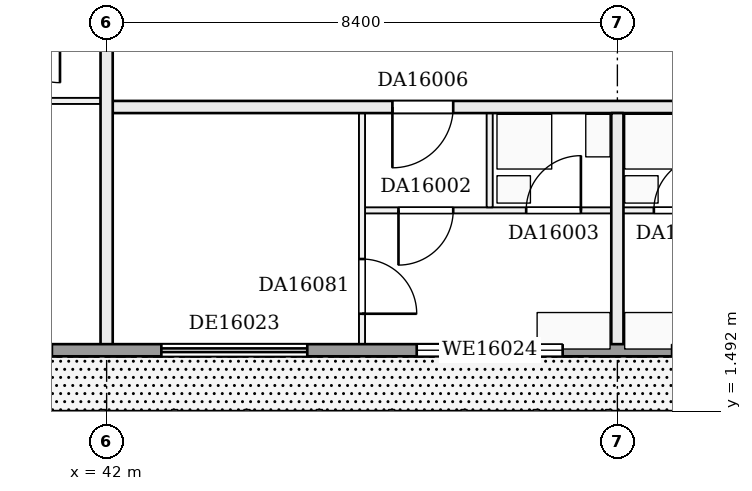
"""IFC4 building model, lengths in metres.
Left out: names, types, materials, properties, quantities, classifications, styles, units other than length and angle.
Written with IfcOpenShell. Run it as: python <this file> out.ifc"""

import sys

from ifc_helpers import new_model, si_unit, direction, frame, frame_2d, origin, place, context, subcontext, project, spatial, rectangle, extrude, element, fill, save


model = new_model("IFC4")
c1 = context("Model", 3, precision=1e-05, world=origin(), true_north=direction((0.0, 1.0)))
c2 = subcontext(c1, "Body", "Model", "MODEL_VIEW")
j1 = project(units=[si_unit("LENGTHUNIT", "METRE"), si_unit("PLANEANGLEUNIT", "RADIAN")], contexts=[c1])
p1 = place(None, origin())
s1 = spatial("IfcSite", under=j1, at=p1, CompositionType="ELEMENT")
p2 = place(p1, origin())
s2 = spatial("IfcBuilding", under=s1, at=p2, CompositionType="ELEMENT")
p3 = place(p2, frame((0.0, 0.0, 67.2)))
s3 = spatial("IfcBuildingStorey", under=s2, at=p3, CompositionType="ELEMENT", Elevation=67.2)
p4 = place(p3, frame((46.25, 4.8, 0.0), z_axis=(0.0, 0.0, 1.0), x_axis=(1.0, 0.0, 0.0)))
e1 = element("IfcWall", 1, at=p4, inside=s3, PredefinedType="PARTITIONING", context=c2, shape_type="SweptSolid", body=[
    extrude(rectangle(XDim=8.3, YDim=0.1, at=frame_2d((4.15, 0.0))), origin(), (0.0, 0.0, 1.0), 3.22),
])
p5 = place(p4, frame((0.55, 0.0, 0.0)))
e2 = element("IfcOpeningElement", 2, at=p5, cuts=e1, PredefinedType="OPENING", context=c2, shape_type="SweptSolid", body=[
    extrude(rectangle(XDim=0.9, YDim=2.1, at=frame_2d((0.45, 1.05))), frame((0.0, 0.06, 0.0), z_axis=(0.0, -1.0, 0.0), x_axis=(1.0, 0.0, 0.0)), (0.0, 0.0, 1.0), 0.12),
])
p6 = place(p4, frame((2.65, 0.0, 0.0)))
e3 = element("IfcOpeningElement", 3, at=p6, cuts=e1, PredefinedType="OPENING", context=c2, shape_type="SweptSolid", body=[
    extrude(rectangle(XDim=0.9, YDim=2.1, at=frame_2d((0.45, 1.05))), frame((0.0, 0.06, 0.0), z_axis=(0.0, -1.0, 0.0), x_axis=(1.0, 0.0, 0.0)), (0.0, 0.0, 1.0), 0.12),
])
p7 = place(p4, frame((6.85, 0.0, 0.0)))
e4 = element("IfcOpeningElement", 4, at=p7, cuts=e1, PredefinedType="OPENING", context=c2, shape_type="SweptSolid", body=[
    extrude(rectangle(XDim=0.9, YDim=2.1, at=frame_2d((0.45, 1.05))), frame((0.0, 0.06, 0.0), z_axis=(0.0, -1.0, 0.0), x_axis=(1.0, 0.0, 0.0)), (0.0, 0.0, 1.0), 0.12),
])
p8 = place(p4, frame((4.75, 0.0, 0.0)))
e5 = element("IfcOpeningElement", 5, at=p8, cuts=e1, PredefinedType="OPENING", context=c2, shape_type="SweptSolid", body=[
    extrude(rectangle(XDim=0.9, YDim=2.1, at=frame_2d((0.45, 1.05))), frame((0.0, 0.06, 0.0), z_axis=(0.0, -1.0, 0.0), x_axis=(1.0, 0.0, 0.0)), (0.0, 0.0, 1.0), 0.12),
])
p9 = place(p3, frame((42.1, 6.5, 0.0), z_axis=(0.0, 0.0, 1.0), x_axis=(1.0, 0.0, 0.0)))
e6 = element("IfcWall", 6, at=p9, inside=s3, PredefinedType="PARTITIONING", context=c2, shape_type="SweptSolid", body=[
    extrude(rectangle(XDim=18.7, YDim=0.2, at=frame_2d((9.35, 0.0))), origin(), (0.0, 0.0, 1.0), 3.22),
])
p10 = place(p9, frame((4.6, 0.0, 0.0)))
e7 = element("IfcOpeningElement", 7, at=p10, cuts=e6, PredefinedType="OPENING", context=c2, shape_type="SweptSolid", body=[
    extrude(rectangle(XDim=1.0, YDim=2.1, at=frame_2d((0.5, 1.05))), frame((0.0, 0.11, 0.0), z_axis=(0.0, -1.0, 0.0), x_axis=(1.0, 0.0, 0.0)), (0.0, 0.0, 1.0), 0.22),
])
p11 = place(p9, frame((10.9, 0.0, 0.0)))
e8 = element("IfcOpeningElement", 8, at=p11, cuts=e6, PredefinedType="OPENING", context=c2, shape_type="SweptSolid", body=[
    extrude(rectangle(XDim=1.0, YDim=2.1, at=frame_2d((0.5, 1.05))), frame((0.0, 0.11, 0.0), z_axis=(0.0, -1.0, 0.0), x_axis=(1.0, 0.0, 0.0)), (0.0, 0.0, 1.0), 0.22),
])
p12 = place(p9, frame((17.1, 0.0, 0.0)))
e9 = element("IfcOpeningElement", 9, at=p12, cuts=e6, PredefinedType="OPENING", context=c2, shape_type="SweptSolid", body=[
    extrude(rectangle(XDim=1.0, YDim=2.1, at=frame_2d((0.5, 1.05))), frame((0.0, 0.11, 0.0), z_axis=(0.0, -1.0, 0.0), x_axis=(1.0, 0.0, 0.0)), (0.0, 0.0, 1.0), 0.22),
])
p13 = place(p3, frame((12.65, 6.6, 0.0), z_axis=(0.0, 0.0, 1.0), x_axis=(1.0, 0.0, 0.0)))
e10 = element("IfcWall", 10, at=p13, inside=s3, PredefinedType="PARTITIONING", context=c2, shape_type="SweptSolid", body=[
    extrude(rectangle(XDim=29.25, YDim=0.1, at=frame_2d((14.625, 0.0))), origin(), (0.0, 0.0, 1.0), 3.22),
])
p14 = place(p13, frame((1.65, 0.0, 0.0)))
e11 = element("IfcOpeningElement", 11, at=p14, cuts=e10, PredefinedType="OPENING", context=c2, shape_type="SweptSolid", body=[
    extrude(rectangle(XDim=0.9, YDim=2.1, at=frame_2d((0.45, 1.05))), frame((0.0, 0.06, 0.0), z_axis=(0.0, -1.0, 0.0), x_axis=(1.0, 0.0, 0.0)), (0.0, 0.0, 1.0), 0.12),
])
p15 = place(p13, frame((6.89, 0.0, 0.0)))
e12 = element("IfcOpeningElement", 12, at=p15, cuts=e10, PredefinedType="OPENING", context=c2, shape_type="SweptSolid", body=[
    extrude(rectangle(XDim=0.9, YDim=2.1, at=frame_2d((0.45, 1.05))), frame((0.0, 0.06, 0.0), z_axis=(0.0, -1.0, 0.0), x_axis=(1.0, 0.0, 0.0)), (0.0, 0.0, 1.0), 0.12),
])
p16 = place(p13, frame((4.85, 0.0, 0.0)))
e13 = element("IfcOpeningElement", 13, at=p16, cuts=e10, PredefinedType="OPENING", context=c2, shape_type="SweptSolid", body=[
    extrude(rectangle(XDim=0.9, YDim=2.1, at=frame_2d((0.45, 1.05))), frame((0.0, 0.06, 0.0), z_axis=(0.0, -1.0, 0.0), x_axis=(1.0, 0.0, 0.0)), (0.0, 0.0, 1.0), 0.12),
])
p17 = place(p13, frame((10.05, 0.0, 0.0)))
e14 = element("IfcOpeningElement", 14, at=p17, cuts=e10, PredefinedType="OPENING", context=c2, shape_type="SweptSolid", body=[
    extrude(rectangle(XDim=0.9, YDim=2.1, at=frame_2d((0.45, 1.05))), frame((0.0, 0.06, 0.0), z_axis=(0.0, -1.0, 0.0), x_axis=(1.0, 0.0, 0.0)), (0.0, 0.0, 1.0), 0.12),
])
p18 = place(p13, frame((16.25, 0.0, 0.0)))
e15 = element("IfcOpeningElement", 15, at=p18, cuts=e10, PredefinedType="OPENING", context=c2, shape_type="SweptSolid", body=[
    extrude(rectangle(XDim=0.9, YDim=2.1, at=frame_2d((0.45, 1.05))), frame((0.0, 0.06, 0.0), z_axis=(0.0, -1.0, 0.0), x_axis=(1.0, 0.0, 0.0)), (0.0, 0.0, 1.0), 0.12),
])
p19 = place(p13, frame((22.55, 0.0, 0.0)))
e16 = element("IfcOpeningElement", 16, at=p19, cuts=e10, PredefinedType="OPENING", context=c2, shape_type="SweptSolid", body=[
    extrude(rectangle(XDim=0.9, YDim=2.1, at=frame_2d((0.45, 1.05))), frame((0.0, 0.06, 0.0), z_axis=(0.0, -1.0, 0.0), x_axis=(1.0, 0.0, 0.0)), (0.0, 0.0, 1.0), 0.12),
])
p20 = place(p13, frame((26.75, 0.0, 0.0)))
e17 = element("IfcOpeningElement", 17, at=p20, cuts=e10, PredefinedType="OPENING", context=c2, shape_type="SweptSolid", body=[
    extrude(rectangle(XDim=0.9, YDim=2.1, at=frame_2d((0.45, 1.05))), frame((0.0, 0.06, 0.0), z_axis=(0.0, -1.0, 0.0), x_axis=(1.0, 0.0, 0.0)), (0.0, 0.0, 1.0), 0.12),
])
p21 = place(p3, frame((42.0, 2.5, 0.0), z_axis=(0.0, 0.0, 1.0), x_axis=(0.0, 1.0, 0.0)))
e18 = element("IfcWall", 18, at=p21, inside=s3, PredefinedType="PARTITIONING", context=c2, shape_type="SweptSolid", body=[
    extrude(rectangle(XDim=5.9, YDim=0.2, at=frame_2d((2.95, 0.0))), origin(), (0.0, 0.0, 1.0), 3.22),
])
p22 = place(p3, frame((46.2, 2.5, 0.0), z_axis=(0.0, 0.0, 1.0), x_axis=(0.0, 1.0, 0.0)))
e19 = element("IfcWall", 19, at=p22, inside=s3, PredefinedType="PARTITIONING", context=c2, shape_type="SweptSolid", body=[
    extrude(rectangle(XDim=3.9, YDim=0.1, at=frame_2d((1.95, 0.0))), origin(), (0.0, 0.0, 1.0), 3.22),
])
p23 = place(p22, frame((0.6, 0.0, 0.0)))
e20 = element("IfcOpeningElement", 20, at=p23, cuts=e19, PredefinedType="OPENING", context=c2, shape_type="SweptSolid", body=[
    extrude(rectangle(XDim=0.9, YDim=2.1, at=frame_2d((0.45, 1.05))), frame((0.0, 0.06, 0.0), z_axis=(0.0, -1.0, 0.0), x_axis=(1.0, 0.0, 0.0)), (0.0, 0.0, 1.0), 0.12),
])
p24 = place(p3, frame((48.3, 4.85, 0.0), z_axis=(0.0, 0.0, 1.0), x_axis=(0.0, 1.0, 0.0)))
e21 = element("IfcWall", 21, at=p24, inside=s3, PredefinedType="PARTITIONING", context=c2, shape_type="SweptSolid", body=[
    extrude(rectangle(XDim=1.55, YDim=0.1, at=frame_2d((0.775, 0.0))), origin(), (0.0, 0.0, 1.0), 3.22),
])
p25 = place(p3, frame((50.4, 2.5, 0.0), z_axis=(0.0, 0.0, 1.0), x_axis=(0.0, 1.0, 0.0)))
e22 = element("IfcWall", 22, at=p25, inside=s3, PredefinedType="PARTITIONING", context=c2, shape_type="SweptSolid", body=[
    extrude(rectangle(XDim=3.9, YDim=0.2, at=frame_2d((1.95, 0.0))), origin(), (0.0, 0.0, 1.0), 3.22),
])
p26 = place(p3, frame((4.8, 2.5, 0.0), z_axis=(0.0, 0.0, 1.0), x_axis=(1.0, 0.0, 0.0)))
e23 = element("IfcWall", 23, at=p26, inside=s3, PredefinedType="SOLIDWALL", context=c2, shape_type="SweptSolid", body=[
    extrude(rectangle(XDim=57.6, YDim=0.2, at=frame_2d((28.8, 0.0))), origin(), (0.0, 0.0, 1.0), 3.22),
])
p27 = place(p26, frame((0.3, 0.0, 0.0)))
e24 = element("IfcOpeningElement", 24, at=p27, cuts=e23, PredefinedType="OPENING", context=c2, shape_type="SweptSolid", body=[
    extrude(rectangle(XDim=2.4, YDim=2.2, at=frame_2d((1.2, 1.1))), frame((0.0, 0.11, 0.0), z_axis=(0.0, -1.0, 0.0), x_axis=(1.0, 0.0, 0.0)), (0.0, 0.0, 1.0), 0.22),
])
p28 = place(p26, frame((4.5, 0.0, 0.9)))
e25 = element("IfcOpeningElement", 25, at=p28, cuts=e23, PredefinedType="OPENING", context=c2, shape_type="SweptSolid", body=[
    extrude(rectangle(XDim=2.4, YDim=1.5, at=frame_2d((1.2, 0.75))), frame((0.0, 0.11, 0.0), z_axis=(0.0, -1.0, 0.0), x_axis=(1.0, 0.0, 0.0)), (0.0, 0.0, 1.0), 0.22),
])
p29 = place(p26, frame((8.7, 0.0, 0.9)))
e26 = element("IfcOpeningElement", 26, at=p29, cuts=e23, PredefinedType="OPENING", context=c2, shape_type="SweptSolid", body=[
    extrude(rectangle(XDim=2.4, YDim=1.5, at=frame_2d((1.2, 0.75))), frame((0.0, 0.11, 0.0), z_axis=(0.0, -1.0, 0.0), x_axis=(1.0, 0.0, 0.0)), (0.0, 0.0, 1.0), 0.22),
])
p30 = place(p26, frame((12.9, 0.0, 0.0)))
e27 = element("IfcOpeningElement", 27, at=p30, cuts=e23, PredefinedType="OPENING", context=c2, shape_type="SweptSolid", body=[
    extrude(rectangle(XDim=2.4, YDim=2.2, at=frame_2d((1.2, 1.1))), frame((0.0, 0.11, 0.0), z_axis=(0.0, -1.0, 0.0), x_axis=(1.0, 0.0, 0.0)), (0.0, 0.0, 1.0), 0.22),
])
p31 = place(p26, frame((17.1, 0.0, 0.9)))
e28 = element("IfcOpeningElement", 28, at=p31, cuts=e23, PredefinedType="OPENING", context=c2, shape_type="SweptSolid", body=[
    extrude(rectangle(XDim=2.4, YDim=1.5, at=frame_2d((1.2, 0.75))), frame((0.0, 0.11, 0.0), z_axis=(0.0, -1.0, 0.0), x_axis=(1.0, 0.0, 0.0)), (0.0, 0.0, 1.0), 0.22),
])
p32 = place(p26, frame((21.3, 0.0, 0.0)))
e29 = element("IfcOpeningElement", 29, at=p32, cuts=e23, PredefinedType="OPENING", context=c2, shape_type="SweptSolid", body=[
    extrude(rectangle(XDim=2.4, YDim=2.2, at=frame_2d((1.2, 1.1))), frame((0.0, 0.11, 0.0), z_axis=(0.0, -1.0, 0.0), x_axis=(1.0, 0.0, 0.0)), (0.0, 0.0, 1.0), 0.22),
])
p33 = place(p26, frame((25.5, 0.0, 0.0)))
e30 = element("IfcOpeningElement", 30, at=p33, cuts=e23, PredefinedType="OPENING", context=c2, shape_type="SweptSolid", body=[
    extrude(rectangle(XDim=2.4, YDim=2.2, at=frame_2d((1.2, 1.1))), frame((0.0, 0.11, 0.0), z_axis=(0.0, -1.0, 0.0), x_axis=(1.0, 0.0, 0.0)), (0.0, 0.0, 1.0), 0.22),
])
p34 = place(p26, frame((29.7, 0.0, 0.0)))
e31 = element("IfcOpeningElement", 31, at=p34, cuts=e23, PredefinedType="OPENING", context=c2, shape_type="SweptSolid", body=[
    extrude(rectangle(XDim=2.4, YDim=2.2, at=frame_2d((1.2, 1.1))), frame((0.0, 0.11, 0.0), z_axis=(0.0, -1.0, 0.0), x_axis=(1.0, 0.0, 0.0)), (0.0, 0.0, 1.0), 0.22),
])
p35 = place(p26, frame((33.9, 0.0, 0.9)))
e32 = element("IfcOpeningElement", 32, at=p35, cuts=e23, PredefinedType="OPENING", context=c2, shape_type="SweptSolid", body=[
    extrude(rectangle(XDim=2.4, YDim=1.5, at=frame_2d((1.2, 0.75))), frame((0.0, 0.11, 0.0), z_axis=(0.0, -1.0, 0.0), x_axis=(1.0, 0.0, 0.0)), (0.0, 0.0, 1.0), 0.22),
])
p36 = place(p26, frame((38.1, 0.0, 0.0)))
e33 = element("IfcOpeningElement", 33, at=p36, cuts=e23, PredefinedType="OPENING", context=c2, shape_type="SweptSolid", body=[
    extrude(rectangle(XDim=2.4, YDim=2.2, at=frame_2d((1.2, 1.1))), frame((0.0, 0.11, 0.0), z_axis=(0.0, -1.0, 0.0), x_axis=(1.0, 0.0, 0.0)), (0.0, 0.0, 1.0), 0.22),
])
p37 = place(p26, frame((42.3, 0.0, 0.9)))
e34 = element("IfcOpeningElement", 34, at=p37, cuts=e23, PredefinedType="OPENING", context=c2, shape_type="SweptSolid", body=[
    extrude(rectangle(XDim=2.4, YDim=1.5, at=frame_2d((1.2, 0.75))), frame((0.0, 0.11, 0.0), z_axis=(0.0, -1.0, 0.0), x_axis=(1.0, 0.0, 0.0)), (0.0, 0.0, 1.0), 0.22),
])
p38 = place(p26, frame((46.5, 0.0, 0.9)))
e35 = element("IfcOpeningElement", 35, at=p38, cuts=e23, PredefinedType="OPENING", context=c2, shape_type="SweptSolid", body=[
    extrude(rectangle(XDim=2.4, YDim=1.5, at=frame_2d((1.2, 0.75))), frame((0.0, 0.11, 0.0), z_axis=(0.0, -1.0, 0.0), x_axis=(1.0, 0.0, 0.0)), (0.0, 0.0, 1.0), 0.22),
])
p39 = place(p26, frame((50.7, 0.0, 0.0)))
e36 = element("IfcOpeningElement", 36, at=p39, cuts=e23, PredefinedType="OPENING", context=c2, shape_type="SweptSolid", body=[
    extrude(rectangle(XDim=2.4, YDim=2.2, at=frame_2d((1.2, 1.1))), frame((0.0, 0.11, 0.0), z_axis=(0.0, -1.0, 0.0), x_axis=(1.0, 0.0, 0.0)), (0.0, 0.0, 1.0), 0.22),
])
p40 = place(p26, frame((54.9, 0.0, 0.9)))
e37 = element("IfcOpeningElement", 37, at=p40, cuts=e23, PredefinedType="OPENING", context=c2, shape_type="SweptSolid", body=[
    extrude(rectangle(XDim=2.4, YDim=1.5, at=frame_2d((1.2, 0.75))), frame((0.0, 0.11, 0.0), z_axis=(0.0, -1.0, 0.0), x_axis=(1.0, 0.0, 0.0)), (0.0, 0.0, 1.0), 0.22),
])
p41 = place(p5, frame((0.9, 0.0, 0.0), z_axis=(0.0, 0.0, 1.0), x_axis=(-1.0, 0.0, 0.0)))
e38 = element("IfcDoor", 38, at=p41, inside=s3, OperationType="SINGLE_SWING_RIGHT", PredefinedType="DOOR", context=c2, shape_type="SweptSolid", body=[
    extrude(rectangle(XDim=0.9, YDim=2.1, at=frame_2d((0.45, 1.05))), frame((0.0, 0.025, 0.0), z_axis=(0.0, -1.0, 0.0), x_axis=(1.0, 0.0, 0.0)), (0.0, 0.0, 1.0), 0.05),
])
fill(e2, e38)
p42 = place(p6, origin())
e39 = element("IfcDoor", 39, at=p42, inside=s3, OperationType="SINGLE_SWING_RIGHT", PredefinedType="DOOR", context=c2, shape_type="SweptSolid", body=[
    extrude(rectangle(XDim=0.9, YDim=2.1, at=frame_2d((0.45, 1.05))), frame((0.0, 0.025, 0.0), z_axis=(0.0, -1.0, 0.0), x_axis=(1.0, 0.0, 0.0)), (0.0, 0.0, 1.0), 0.05),
])
fill(e3, e39)
p43 = place(p8, origin())
e40 = element("IfcDoor", 40, at=p43, inside=s3, OperationType="SINGLE_SWING_RIGHT", PredefinedType="DOOR", context=c2, shape_type="SweptSolid", body=[
    extrude(rectangle(XDim=0.9, YDim=2.1, at=frame_2d((0.45, 1.05))), frame((0.0, 0.025, 0.0), z_axis=(0.0, -1.0, 0.0), x_axis=(1.0, 0.0, 0.0)), (0.0, 0.0, 1.0), 0.05),
])
fill(e5, e40)
p44 = place(p10, frame((1.0, 0.0, 0.0), z_axis=(0.0, 0.0, 1.0), x_axis=(-1.0, 0.0, 0.0)))
e41 = element("IfcDoor", 41, at=p44, inside=s3, OperationType="SINGLE_SWING_RIGHT", PredefinedType="DOOR", context=c2, shape_type="SweptSolid", body=[
    extrude(rectangle(XDim=1.0, YDim=2.1, at=frame_2d((0.5, 1.05))), frame((0.0, 0.025, 0.0), z_axis=(0.0, -1.0, 0.0), x_axis=(1.0, 0.0, 0.0)), (0.0, 0.0, 1.0), 0.05),
])
fill(e7, e41)
p45 = place(p23, frame((0.9, 0.0, 0.0), z_axis=(0.0, 0.0, 1.0), x_axis=(-1.0, 0.0, 0.0)))
e42 = element("IfcDoor", 42, at=p45, inside=s3, OperationType="SINGLE_SWING_RIGHT", PredefinedType="DOOR", context=c2, shape_type="SweptSolid", body=[
    extrude(rectangle(XDim=0.9, YDim=2.1, at=frame_2d((0.45, 1.05))), frame((0.0, 0.025, 0.0), z_axis=(0.0, -1.0, 0.0), x_axis=(1.0, 0.0, 0.0)), (0.0, 0.0, 1.0), 0.05),
])
fill(e20, e42)
p46 = place(p36, origin())
e43 = element("IfcDoor", 43, at=p46, inside=s3, OperationType="DOUBLE_DOOR_SLIDING", PredefinedType="DOOR", context=c2, shape_type="SweptSolid", body=[
    extrude(rectangle(XDim=2.4, YDim=2.2, at=frame_2d((1.2, 1.1))), frame((0.0, 0.025, 0.0), z_axis=(0.0, -1.0, 0.0), x_axis=(1.0, 0.0, 0.0)), (0.0, 0.0, 1.0), 0.05),
])
fill(e33, e43)
p47 = place(p37, origin())
e44 = element("IfcWindow", 44, at=p47, inside=s3, PartitioningType="SINGLE_PANEL", PredefinedType="WINDOW", context=c2, shape_type="SweptSolid", body=[
    extrude(rectangle(XDim=2.4, YDim=1.5, at=frame_2d((1.2, 0.75))), frame((0.0, 0.03, 0.0), z_axis=(0.0, -1.0, 0.0), x_axis=(1.0, 0.0, 0.0)), (0.0, 0.0, 1.0), 0.06),
])
fill(e34, e44)
save(model, sys.argv[1])
